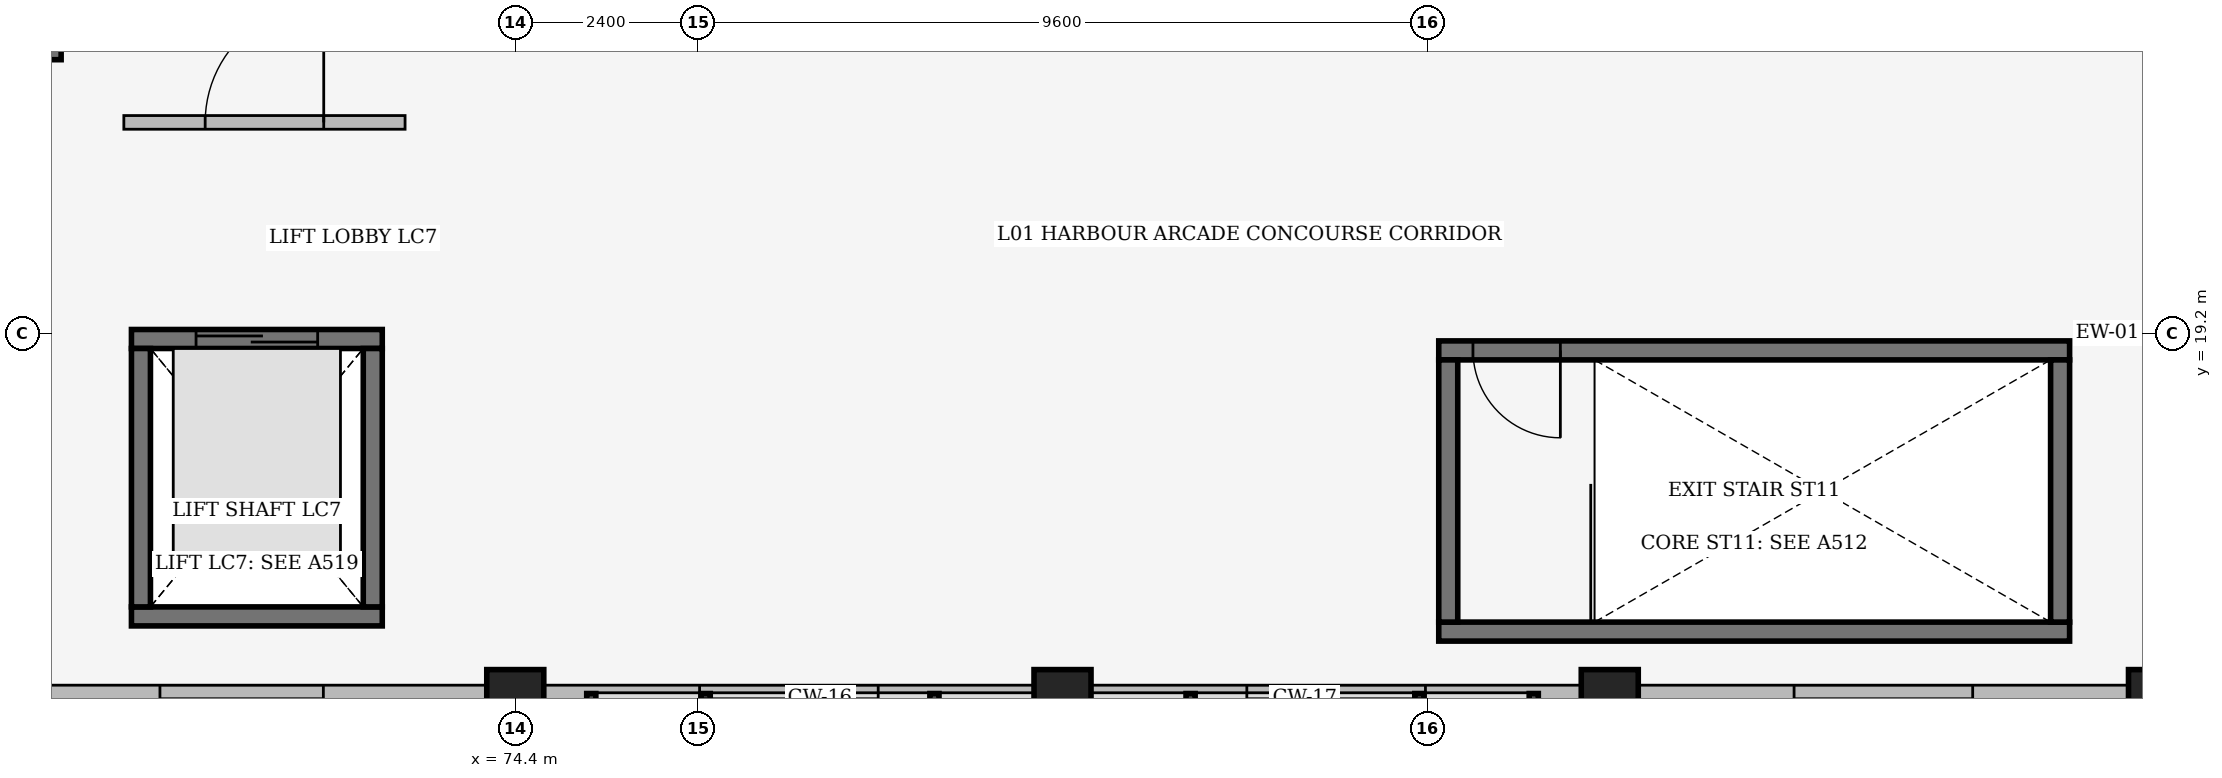
"""IFC4 building model, lengths in metres.
Left out: names, types, materials, properties, quantities, classifications, styles, units other than length and angle.
Written with IfcOpenShell. Run it as: python <this file> out.ifc"""

import sys

from ifc_helpers import new_model, si_unit, direction, frame, frame_2d, origin, origin_2d, place, context, subcontext, project, spatial, rectangle, extrude, element, fill, save


model = new_model("IFC4")
c1 = context("Model", 3, precision=1e-05, world=origin(), true_north=direction((0.0, 1.0)))
c2 = subcontext(c1, "Body", "Model", "MODEL_VIEW")
j1 = project(units=[si_unit("LENGTHUNIT", "METRE"), si_unit("PLANEANGLEUNIT", "RADIAN")], contexts=[c1])
p1 = place(None, origin())
s1 = spatial("IfcSite", under=j1, at=p1, CompositionType="ELEMENT")
p2 = place(p1, origin())
s2 = spatial("IfcBuilding", under=s1, at=p2, CompositionType="ELEMENT")
p3 = place(p2, frame((0.0, 0.0, 5.4)))
s3 = spatial("IfcBuildingStorey", under=s2, at=p3, CompositionType="ELEMENT", Elevation=5.4)
for number, where, z_axis, x_axis in (
    (1, (74.4, 14.4, 0.0), (0.0, 0.0, 1.0), (1.0, 0.0, 0.0)),
    (2, (81.6, 14.4, 0.0), (0.0, 0.0, 1.0), (1.0, 0.0, 0.0)),
    (3, (88.8, 14.4, 0.0), (0.0, 0.0, 1.0), (1.0, 0.0, 0.0)),
    (4, (96.0, 14.4, 0.0), (0.0, 0.0, 1.0), (1.0, 0.0, 0.0)),
):
    element("IfcColumn", number, at=place(p3, frame(where, z_axis=z_axis, x_axis=x_axis)), inside=s3, PredefinedType="COLUMN", context=c2, shape_type="SweptSolid", body=[
        extrude(rectangle(XDim=0.75, YDim=0.75, at=origin_2d()), origin(), (0.0, 0.0, 1.0), 5.1),
    ])
p4 = place(p3, frame((68.2, 22.8, 0.0), z_axis=(0.0, 0.0, 1.0), x_axis=(0.0, 1.0, 0.0)))
e5 = element("IfcWall", 5, at=p4, inside=s3, PredefinedType="SHEAR", context=c2, shape_type="SweptSolid", body=[
    extrude(rectangle(XDim=6.0, YDim=0.45, at=frame_2d((3.0, 0.0))), origin(), (0.0, 0.0, 1.0), 5.1),
])
p5 = place(p3, frame((67.583, 14.4, 0.0), z_axis=(0.0, 0.0, 1.0), x_axis=(1.0, 0.0, 0.0)))
e6 = element("IfcWall", 6, at=p5, inside=s3, PredefinedType="SOLIDWALL", context=c2, shape_type="SweptSolid", body=[
    extrude(rectangle(XDim=6.434, YDim=0.34, at=frame_2d((3.217, 0.0))), origin(), (0.0, 0.0, 1.0), 4.606),
])
p6 = place(p5, frame((2.142, 0.0, 0.95)))
e7 = element("IfcOpeningElement", 7, at=p6, cuts=e6, PredefinedType="OPENING", context=c2, shape_type="SweptSolid", body=[
    extrude(rectangle(XDim=2.15, YDim=2.1, at=frame_2d((1.075, 1.05))), frame((0.0, 0.18, 0.0), z_axis=(0.0, -1.0, 0.0), x_axis=(1.0, 0.0, 0.0)), (0.0, 0.0, 1.0), 0.36),
])
p7 = place(p3, frame((74.783, 14.4, 0.0), z_axis=(0.0, 0.0, 1.0), x_axis=(1.0, 0.0, 0.0)))
e8 = element("IfcWall", 8, at=p7, inside=s3, PredefinedType="SOLIDWALL", context=c2, shape_type="SweptSolid", body=[
    extrude(rectangle(XDim=6.434, YDim=0.34, at=frame_2d((3.217, 0.0))), origin(), (0.0, 0.0, 1.0), 4.606),
])
p8 = place(p7, frame((2.042, 0.0, 0.95)))
e9 = element("IfcOpeningElement", 9, at=p8, cuts=e8, PredefinedType="OPENING", context=c2, shape_type="SweptSolid", body=[
    extrude(rectangle(XDim=2.35, YDim=1.2, at=frame_2d((1.175, 0.6))), frame((0.0, 0.18, 0.0), z_axis=(0.0, -1.0, 0.0), x_axis=(1.0, 0.0, 0.0)), (0.0, 0.0, 1.0), 0.36),
])
p9 = place(p3, frame((81.983, 14.4, 0.0), z_axis=(0.0, 0.0, 1.0), x_axis=(1.0, 0.0, 0.0)))
e10 = element("IfcWall", 10, at=p9, inside=s3, PredefinedType="SOLIDWALL", context=c2, shape_type="SweptSolid", body=[
    extrude(rectangle(XDim=6.434, YDim=0.34, at=frame_2d((3.217, 0.0))), origin(), (0.0, 0.0, 1.0), 4.606),
])
p10 = place(p9, frame((2.042, 0.0, 0.95)))
e11 = element("IfcOpeningElement", 11, at=p10, cuts=e10, PredefinedType="OPENING", context=c2, shape_type="SweptSolid", body=[
    extrude(rectangle(XDim=2.35, YDim=1.5, at=frame_2d((1.175, 0.75))), frame((0.0, 0.18, 0.0), z_axis=(0.0, -1.0, 0.0), x_axis=(1.0, 0.0, 0.0)), (0.0, 0.0, 1.0), 0.36),
])
p11 = place(p3, frame((89.183, 14.4, 0.0), z_axis=(0.0, 0.0, 1.0), x_axis=(1.0, 0.0, 0.0)))
e12 = element("IfcWall", 12, at=p11, inside=s3, PredefinedType="SOLIDWALL", context=c2, shape_type="SweptSolid", body=[
    extrude(rectangle(XDim=6.434, YDim=0.34, at=frame_2d((3.217, 0.0))), origin(), (0.0, 0.0, 1.0), 4.606),
])
p12 = place(p11, frame((2.042, 0.0, 0.95)))
e13 = element("IfcOpeningElement", 13, at=p12, cuts=e12, PredefinedType="OPENING", context=c2, shape_type="SweptSolid", body=[
    extrude(rectangle(XDim=2.35, YDim=1.8, at=frame_2d((1.175, 0.9))), frame((0.0, 0.18, 0.0), z_axis=(0.0, -1.0, 0.0), x_axis=(1.0, 0.0, 0.0)), (0.0, 0.0, 1.0), 0.36),
])
p13 = place(p3, frame((86.55, 15.275, 0.0), z_axis=(0.0, 0.0, 1.0), x_axis=(1.0, 0.0, 0.0)))
e14 = element("IfcWall", 14, at=p13, inside=s3, PredefinedType="SHEAR", context=c2, shape_type="SweptSolid", body=[
    extrude(rectangle(XDim=8.3, YDim=0.25, at=frame_2d((4.15, 0.0))), origin(), (0.0, 0.0, 1.0), 5.1),
])
p14 = place(p3, frame((94.85, 18.975, 0.0), z_axis=(0.0, 0.0, 1.0), x_axis=(-1.0, 0.0, 0.0)))
e15 = element("IfcWall", 15, at=p14, inside=s3, PredefinedType="SHEAR", context=c2, shape_type="SweptSolid", body=[
    extrude(rectangle(XDim=8.3, YDim=0.25, at=frame_2d((4.15, 0.0))), origin(), (0.0, 0.0, 1.0), 5.1),
])
p15 = place(p14, frame((7.85, 0.0, 0.0), z_axis=(0.0, 0.0, 1.0), x_axis=(-1.0, 0.0, 0.0)))
e16 = element("IfcOpeningElement", 16, at=p15, cuts=e15, PredefinedType="OPENING", context=c2, shape_type="SweptSolid", body=[
    extrude(rectangle(XDim=1.15, YDim=2.2, at=frame_2d((0.575, 1.1))), frame((0.0, 0.135, 0.0), z_axis=(0.0, -1.0, 0.0), x_axis=(1.0, 0.0, 0.0)), (0.0, 0.0, 1.0), 0.27),
])
for number, where, z_axis, x_axis in (
    (17, (86.675, 18.85, 0.0), (0.0, 0.0, 1.0), (0.0, -1.0, 0.0)),
    (18, (94.725, 15.4, 0.0), (0.0, 0.0, 1.0), (0.0, 1.0, 0.0)),
):
    element("IfcWall", number, at=place(p3, frame(where, z_axis=z_axis, x_axis=x_axis)), inside=s3, PredefinedType="SHEAR", context=c2, shape_type="SweptSolid", body=[
        extrude(rectangle(XDim=3.45, YDim=0.25, at=frame_2d((1.725, 0.0))), origin(), (0.0, 0.0, 1.0), 5.1),
    ])
p16 = place(p3, frame((69.35, 15.475, 0.0), z_axis=(0.0, 0.0, 1.0), x_axis=(1.0, 0.0, 0.0)))
e19 = element("IfcWall", 19, at=p16, inside=s3, PredefinedType="SHEAR", context=c2, shape_type="SweptSolid", body=[
    extrude(rectangle(XDim=3.3, YDim=0.25, at=frame_2d((1.65, 0.0))), origin(), (0.0, 0.0, 1.0), 5.1),
])
p17 = place(p3, frame((69.35, 19.125, 0.0), z_axis=(0.0, 0.0, 1.0), x_axis=(1.0, 0.0, 0.0)))
e20 = element("IfcWall", 20, at=p17, inside=s3, PredefinedType="SHEAR", context=c2, shape_type="SweptSolid", body=[
    extrude(rectangle(XDim=3.3, YDim=0.25, at=frame_2d((1.65, 0.0))), origin(), (0.0, 0.0, 1.0), 5.1),
])
p18 = place(p17, frame((0.85, 0.0, 0.0)))
e21 = element("IfcOpeningElement", 21, at=p18, cuts=e20, PredefinedType="OPENING", context=c2, shape_type="SweptSolid", body=[
    extrude(rectangle(XDim=1.6, YDim=2.3, at=frame_2d((0.8, 1.15))), frame((0.0, 0.135, 0.0), z_axis=(0.0, -1.0, 0.0), x_axis=(1.0, 0.0, 0.0)), (0.0, 0.0, 1.0), 0.27),
])
for number, where, z_axis, x_axis in (
    (22, (69.475, 15.6, 0.0), (0.0, 0.0, 1.0), (0.0, 1.0, 0.0)),
    (23, (72.525, 15.6, 0.0), (0.0, 0.0, 1.0), (0.0, 1.0, 0.0)),
):
    element("IfcWall", number, at=place(p3, frame(where, z_axis=z_axis, x_axis=x_axis)), inside=s3, PredefinedType="SHEAR", context=c2, shape_type="SweptSolid", body=[
        extrude(rectangle(XDim=3.4, YDim=0.25, at=frame_2d((1.7, 0.0))), origin(), (0.0, 0.0, 1.0), 5.1),
    ])
p19 = place(p3, frame((69.25, 21.975, 0.0), z_axis=(0.0, 0.0, 1.0), x_axis=(1.0, 0.0, 0.0)))
e24 = element("IfcWall", 24, at=p19, inside=s3, PredefinedType="PARTITIONING", context=c2, shape_type="SweptSolid", body=[
    extrude(rectangle(XDim=3.7, YDim=0.18, at=frame_2d((1.85, 0.0))), origin(), (0.0, 0.0, 1.0), 4.74),
])
p20 = place(p19, frame((1.07, 0.0, 0.0)))
e25 = element("IfcOpeningElement", 25, at=p20, cuts=e24, PredefinedType="OPENING", context=c2, shape_type="SweptSolid", body=[
    extrude(rectangle(XDim=1.56, YDim=2.32, at=frame_2d((0.78, 1.16))), frame((0.0, 0.1, 0.0), z_axis=(0.0, -1.0, 0.0), x_axis=(1.0, 0.0, 0.0)), (0.0, 0.0, 1.0), 0.2),
])
p21 = place(p6, origin())
e26 = element("IfcWindow", 26, at=p21, inside=s3, PartitioningType="SINGLE_PANEL", PredefinedType="WINDOW", context=c2, shape_type="SweptSolid", body=[
    extrude(rectangle(XDim=2.15, YDim=2.1, at=frame_2d((1.075, 1.05))), frame((0.0, 0.03, 0.0), z_axis=(0.0, -1.0, 0.0), x_axis=(1.0, 0.0, 0.0)), (0.0, 0.0, 1.0), 0.06),
])
fill(e7, e26)
p22 = place(p8, origin())
e27 = element("IfcWindow", 27, at=p22, inside=s3, PartitioningType="SINGLE_PANEL", PredefinedType="WINDOW", context=c2, shape_type="SweptSolid", body=[
    extrude(rectangle(XDim=2.35, YDim=1.2, at=frame_2d((1.175, 0.6))), frame((0.0, 0.03, 0.0), z_axis=(0.0, -1.0, 0.0), x_axis=(1.0, 0.0, 0.0)), (0.0, 0.0, 1.0), 0.06),
])
fill(e9, e27)
p23 = place(p10, origin())
e28 = element("IfcWindow", 28, at=p23, inside=s3, PartitioningType="SINGLE_PANEL", PredefinedType="WINDOW", context=c2, shape_type="SweptSolid", body=[
    extrude(rectangle(XDim=2.35, YDim=1.5, at=frame_2d((1.175, 0.75))), frame((0.0, 0.03, 0.0), z_axis=(0.0, -1.0, 0.0), x_axis=(1.0, 0.0, 0.0)), (0.0, 0.0, 1.0), 0.06),
])
fill(e11, e28)
p24 = place(p12, origin())
e29 = element("IfcWindow", 29, at=p24, inside=s3, PartitioningType="SINGLE_PANEL", PredefinedType="WINDOW", context=c2, shape_type="SweptSolid", body=[
    extrude(rectangle(XDim=2.35, YDim=1.8, at=frame_2d((1.175, 0.9))), frame((0.0, 0.03, 0.0), z_axis=(0.0, -1.0, 0.0), x_axis=(1.0, 0.0, 0.0)), (0.0, 0.0, 1.0), 0.06),
])
fill(e13, e29)
p25 = place(p15, origin())
e30 = element("IfcDoor", 30, at=p25, inside=s3, OperationType="SINGLE_SWING_RIGHT", PredefinedType="DOOR", context=c2, shape_type="SweptSolid", body=[
    extrude(rectangle(XDim=1.15, YDim=2.2, at=frame_2d((0.575, 1.1))), frame((0.0, 0.025, 0.0), z_axis=(0.0, -1.0, 0.0), x_axis=(1.0, 0.0, 0.0)), (0.0, 0.0, 1.0), 0.05),
])
fill(e16, e30)
p26 = place(p18, origin())
e31 = element("IfcDoor", 31, at=p26, inside=s3, OperationType="DOUBLE_DOOR_SLIDING", PredefinedType="DOOR", context=c2, shape_type="SweptSolid", body=[
    extrude(rectangle(XDim=1.6, YDim=2.3, at=frame_2d((0.8, 1.15))), frame((0.0, 0.025, 0.0), z_axis=(0.0, -1.0, 0.0), x_axis=(1.0, 0.0, 0.0)), (0.0, 0.0, 1.0), 0.05),
])
fill(e21, e31)
p27 = place(p20, origin())
e32 = element("IfcDoor", 32, at=p27, inside=s3, OperationType="SINGLE_SWING_RIGHT", PredefinedType="DOOR", context=c2, shape_type="SweptSolid", body=[
    extrude(rectangle(XDim=1.56, YDim=2.32, at=frame_2d((0.78, 1.16))), frame((0.0, 0.025, 0.0), z_axis=(0.0, -1.0, 0.0), x_axis=(1.0, 0.0, 0.0)), (0.0, 0.0, 1.0), 0.05),
])
fill(e25, e32)
save(model, sys.argv[1])
